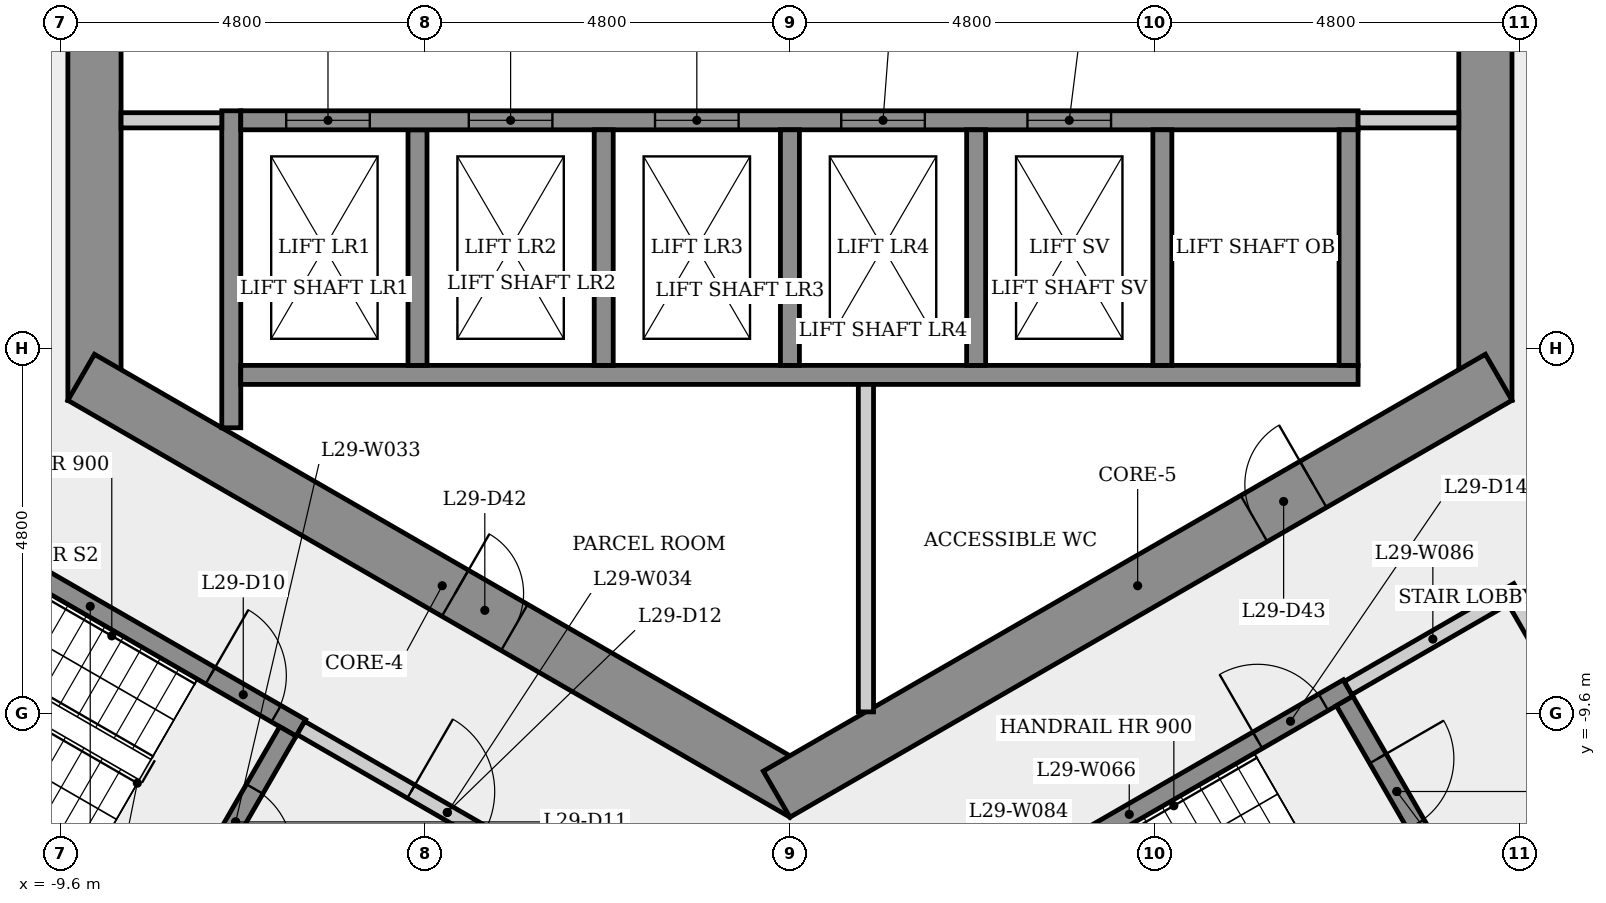
"""IFC4 building model, lengths in metres.
Left out: names, types, materials, properties, quantities, classifications, styles, units other than length and angle.
Written with IfcOpenShell. Run it as: python <this file> out.ifc"""

import sys

from ifc_helpers import new_model, si_unit, direction, frame, frame_2d, origin, place, context, subcontext, project, spatial, rectangle, extrude, element, fill, save


model = new_model("IFC4")
c1 = context("Model", 3, precision=1e-05, world=origin(), true_north=direction((0.0, 1.0)))
c2 = subcontext(c1, "Body", "Model", "MODEL_VIEW")
j1 = project(units=[si_unit("LENGTHUNIT", "METRE"), si_unit("PLANEANGLEUNIT", "RADIAN")], contexts=[c1])
p1 = place(None, origin())
s1 = spatial("IfcSite", under=j1, at=p1, CompositionType="ELEMENT")
p2 = place(p1, origin())
s2 = spatial("IfcBuilding", under=s1, at=p2, CompositionType="ELEMENT")
p3 = place(p2, frame((0.0, 0.0, 110.3)))
s3 = spatial("IfcBuildingStorey", under=s2, at=p3, CompositionType="ELEMENT", Elevation=110.3)
p4 = place(p3, frame((9.15, -5.485, 0.0), z_axis=(0.0, 0.0, 1.0), x_axis=(0.0, 1.0, 0.0)))
e1 = element("IfcWall", 1, at=p4, inside=s3, PredefinedType="SHEAR", context=c2, shape_type="SweptSolid", body=[
    extrude(rectangle(XDim=10.97, YDim=0.7, at=frame_2d((5.485, 0.0))), origin(), (0.0, 0.0, 1.0), 3.4),
])
p5 = place(p4, frame((4.685, 0.0, 0.0)))
e2 = element("IfcOpeningElement", 2, at=p5, cuts=e1, PredefinedType="OPENING", context=c2, shape_type="SweptSolid", body=[
    extrude(rectangle(XDim=1.6, YDim=2.1, at=frame_2d((0.8, 1.05))), frame((0.0, 0.36, 0.0), z_axis=(0.0, -1.0, 0.0), x_axis=(1.0, 0.0, 0.0)), (0.0, 0.0, 1.0), 0.72),
])
p6 = place(p3, frame((-9.15, 5.485, 0.0), z_axis=(0.0, 0.0, 1.0), x_axis=(0.0, -1.0, 0.0)))
e3 = element("IfcWall", 3, at=p6, inside=s3, PredefinedType="SHEAR", context=c2, shape_type="SweptSolid", body=[
    extrude(rectangle(XDim=10.97, YDim=0.7, at=frame_2d((5.485, 0.0))), origin(), (0.0, 0.0, 1.0), 3.4),
])
p7 = place(p6, frame((4.685, 0.0, 0.0)))
e4 = element("IfcOpeningElement", 4, at=p7, cuts=e3, PredefinedType="OPENING", context=c2, shape_type="SweptSolid", body=[
    extrude(rectangle(XDim=1.6, YDim=2.1, at=frame_2d((0.8, 1.05))), frame((0.0, 0.36, 0.0), z_axis=(0.0, -1.0, 0.0), x_axis=(1.0, 0.0, 0.0)), (0.0, 0.0, 1.0), 0.72),
])
p8 = place(p3, frame((-9.325, -5.182, 0.0), z_axis=(0.0, 0.0, 1.0), x_axis=(0.866023993627, -0.500002442456, 0.0)))
e5 = element("IfcWall", 5, at=p8, inside=s3, PredefinedType="SHEAR", context=c2, shape_type="SweptSolid", body=[
    extrude(rectangle(XDim=10.97, YDim=0.7, at=frame_2d((5.485, 0.0))), origin(), (0.0, 0.0, 1.0), 3.4),
])
p9 = place(p8, frame((5.682, 0.0, 0.0)))
e6 = element("IfcOpeningElement", 6, at=p9, cuts=e5, PredefinedType="OPENING", context=c2, shape_type="SweptSolid", body=[
    extrude(rectangle(XDim=0.9, YDim=2.1, at=frame_2d((0.45, 1.05))), frame((0.0, 0.36, 0.0), z_axis=(0.0, -1.0, 0.0), x_axis=(1.0, 0.0, 0.0)), (0.0, 0.0, 1.0), 0.72),
])
p10 = place(p3, frame((-0.175, -10.667, 0.0), z_axis=(0.0, 0.0, 1.0), x_axis=(0.866023993627, 0.500002442456, 0.0)))
e7 = element("IfcWall", 7, at=p10, inside=s3, PredefinedType="SHEAR", context=c2, shape_type="SweptSolid", body=[
    extrude(rectangle(XDim=10.97, YDim=0.7, at=frame_2d((5.485, 0.0))), origin(), (0.0, 0.0, 1.0), 3.4),
])
p11 = place(p10, frame((7.252, 0.0, 0.0)))
e8 = element("IfcOpeningElement", 8, at=p11, cuts=e7, PredefinedType="OPENING", context=c2, shape_type="SweptSolid", body=[
    extrude(rectangle(XDim=0.9, YDim=2.1, at=frame_2d((0.45, 1.05))), frame((0.0, 0.36, 0.0), z_axis=(0.0, -1.0, 0.0), x_axis=(1.0, 0.0, 0.0)), (0.0, 0.0, 1.0), 0.72),
])
p12 = place(p3, frame((-11.977, -6.595, 0.0), z_axis=(0.0, 0.0, 1.0), x_axis=(0.866025499775, -0.499999833739, 0.0)))
e9 = element("IfcWall", 9, at=p12, inside=s3, PredefinedType="SHEAR", context=c2, shape_type="SweptSolid", body=[
    extrude(rectangle(XDim=6.4, YDim=0.25, at=frame_2d((3.2, 0.0))), origin(), (0.0, 0.0, 1.0), 3.05),
])
p13 = place(p12, frame((5.025, 0.0, 0.0)))
e10 = element("IfcOpeningElement", 10, at=p13, cuts=e9, PredefinedType="OPENING", context=c2, shape_type="SweptSolid", body=[
    extrude(rectangle(XDim=1.0, YDim=2.1, at=frame_2d((0.5, 1.05))), frame((0.0, 0.135, 0.0), z_axis=(0.0, -1.0, 0.0), x_axis=(1.0, 0.0, 0.0)), (0.0, 0.0, 1.0), 0.27),
])
p14 = place(p3, frame((-7.935, -12.393, 0.0), z_axis=(0.0, 0.0, 1.0), x_axis=(-0.866025499775, 0.499999833739, 0.0)))
e11 = element("IfcWall", 11, at=p14, inside=s3, PredefinedType="SHEAR", context=c2, shape_type="SweptSolid", body=[
    extrude(rectangle(XDim=6.4, YDim=0.25, at=frame_2d((3.2, 0.0))), origin(), (0.0, 0.0, 1.0), 3.05),
])
p15 = place(p3, frame((-7.35, -5.846, 0.0), z_axis=(0.0, 0.0, 1.0), x_axis=(0.0, 1.0, 0.0)))
e12 = element("IfcWall", 12, at=p15, inside=s3, PredefinedType="SHEAR", context=c2, shape_type="SweptSolid", body=[
    extrude(rectangle(XDim=4.171, YDim=0.25, at=frame_2d((2.085, 0.0))), origin(), (0.0, 0.0, 1.0), 3.05),
])
p16 = place(p3, frame((-7.475, -1.8, 0.0), z_axis=(0.0, 0.0, 1.0), x_axis=(-1.0, 0.0, 0.0)))
e13 = element("IfcWall", 13, at=p16, inside=s3, PredefinedType="PARTITIONING", context=c2, shape_type="SweptSolid", body=[
    extrude(rectangle(XDim=1.325, YDim=0.2, at=frame_2d((0.663, 0.0))), origin(), (0.0, 0.0, 1.0), 3.05),
])
p17 = place(p3, frame((-6.605, -9.841, 0.0), z_axis=(0.0, 0.0, 1.0), x_axis=(-0.499996545922, -0.866027397988, 0.0)))
e14 = element("IfcWall", 14, at=p17, inside=s3, PredefinedType="SHEAR", context=c2, shape_type="SweptSolid", body=[
    extrude(rectangle(XDim=2.75, YDim=0.25, at=frame_2d((1.375, 0.0))), origin(), (0.0, 0.0, 1.0), 3.05),
])
p18 = place(p17, frame((0.875, 0.0, 0.0)))
e15 = element("IfcOpeningElement", 15, at=p18, cuts=e14, PredefinedType="OPENING", context=c2, shape_type="SweptSolid", body=[
    extrude(rectangle(XDim=1.0, YDim=2.1, at=frame_2d((0.5, 1.05))), frame((0.0, 0.135, 0.0), z_axis=(0.0, -1.0, 0.0), x_axis=(1.0, 0.0, 0.0)), (0.0, 0.0, 1.0), 0.27),
])
p19 = place(p3, frame((-6.435, -9.795, 0.0), z_axis=(0.0, 0.0, 1.0), x_axis=(0.866012907634, -0.500021643343, 0.0)))
e16 = element("IfcWall", 16, at=p19, inside=s3, PredefinedType="PARTITIONING", context=c2, shape_type="SweptSolid", body=[
    extrude(rectangle(XDim=4.45, YDim=0.2, at=frame_2d((2.225, 0.0))), origin(), (0.0, 0.0, 1.0), 3.05),
])
p20 = place(p19, frame((1.675, 0.0, 0.0)))
e17 = element("IfcOpeningElement", 17, at=p20, cuts=e16, PredefinedType="OPENING", context=c2, shape_type="SweptSolid", body=[
    extrude(rectangle(XDim=1.1, YDim=2.1, at=frame_2d((0.55, 1.05))), frame((0.0, 0.11, 0.0), z_axis=(0.0, -1.0, 0.0), x_axis=(1.0, 0.0, 0.0)), (0.0, 0.0, 1.0), 0.22),
])
p21 = place(p3, frame((-7.225, -5.15, 0.0), z_axis=(0.0, 0.0, 1.0), x_axis=(1.0, 0.0, 0.0)))
e18 = element("IfcWall", 18, at=p21, inside=s3, PredefinedType="SHEAR", context=c2, shape_type="SweptSolid", body=[
    extrude(rectangle(XDim=14.7, YDim=0.25, at=frame_2d((7.35, 0.0))), origin(), (0.0, 0.0, 1.0), 3.05),
])
p22 = place(p3, frame((-4.9, -1.925, 0.0), z_axis=(0.0, 0.0, 1.0), x_axis=(0.0, -1.0, 0.0)))
e19 = element("IfcWall", 19, at=p22, inside=s3, PredefinedType="SHEAR", context=c2, shape_type="SweptSolid", body=[
    extrude(rectangle(XDim=3.1, YDim=0.25, at=frame_2d((1.55, 0.0))), origin(), (0.0, 0.0, 1.0), 3.4),
])
p23 = place(p3, frame((-7.225, -1.8, 0.0), z_axis=(0.0, 0.0, 1.0), x_axis=(1.0, 0.0, 0.0)))
e20 = element("IfcWall", 20, at=p23, inside=s3, PredefinedType="SHEAR", context=c2, shape_type="SweptSolid", body=[
    extrude(rectangle(XDim=14.7, YDim=0.25, at=frame_2d((7.35, 0.0))), origin(), (0.0, 0.0, 1.0), 3.05),
])
p24 = place(p23, frame((0.597, 0.0, 0.0)))
e21 = element("IfcOpeningElement", 21, at=p24, cuts=e20, PredefinedType="OPENING", context=c2, shape_type="SweptSolid", body=[
    extrude(rectangle(XDim=1.1, YDim=2.1, at=frame_2d((0.55, 1.05))), frame((0.0, 0.135, 0.0), z_axis=(0.0, -1.0, 0.0), x_axis=(1.0, 0.0, 0.0)), (0.0, 0.0, 1.0), 0.27),
])
p25 = place(p23, frame((3.0, 0.0, 0.0)))
e22 = element("IfcOpeningElement", 22, at=p25, cuts=e20, PredefinedType="OPENING", context=c2, shape_type="SweptSolid", body=[
    extrude(rectangle(XDim=1.1, YDim=2.1, at=frame_2d((0.55, 1.05))), frame((0.0, 0.135, 0.0), z_axis=(0.0, -1.0, 0.0), x_axis=(1.0, 0.0, 0.0)), (0.0, 0.0, 1.0), 0.27),
])
p26 = place(p23, frame((5.45, 0.0, 0.0)))
e23 = element("IfcOpeningElement", 23, at=p26, cuts=e20, PredefinedType="OPENING", context=c2, shape_type="SweptSolid", body=[
    extrude(rectangle(XDim=1.1, YDim=2.1, at=frame_2d((0.55, 1.05))), frame((0.0, 0.135, 0.0), z_axis=(0.0, -1.0, 0.0), x_axis=(1.0, 0.0, 0.0)), (0.0, 0.0, 1.0), 0.27),
])
p27 = place(p23, frame((7.9, 0.0, 0.0)))
e24 = element("IfcOpeningElement", 24, at=p27, cuts=e20, PredefinedType="OPENING", context=c2, shape_type="SweptSolid", body=[
    extrude(rectangle(XDim=1.1, YDim=2.1, at=frame_2d((0.55, 1.05))), frame((0.0, 0.135, 0.0), z_axis=(0.0, -1.0, 0.0), x_axis=(1.0, 0.0, 0.0)), (0.0, 0.0, 1.0), 0.27),
])
p28 = place(p23, frame((10.35, 0.0, 0.0)))
e25 = element("IfcOpeningElement", 25, at=p28, cuts=e20, PredefinedType="OPENING", context=c2, shape_type="SweptSolid", body=[
    extrude(rectangle(XDim=1.1, YDim=2.1, at=frame_2d((0.55, 1.05))), frame((0.0, 0.135, 0.0), z_axis=(0.0, -1.0, 0.0), x_axis=(1.0, 0.0, 0.0)), (0.0, 0.0, 1.0), 0.27),
])
for number, where, z_axis, x_axis in (
    (26, (-2.45, -1.925, 0.0), (0.0, 0.0, 1.0), (0.0, -1.0, 0.0)),
    (27, (0.0, -1.925, 0.0), (0.0, 0.0, 1.0), (0.0, -1.0, 0.0)),
):
    element("IfcWall", number, at=place(p3, frame(where, z_axis=z_axis, x_axis=x_axis)), inside=s3, PredefinedType="SHEAR", context=c2, shape_type="SweptSolid", body=[
        extrude(rectangle(XDim=3.1, YDim=0.25, at=frame_2d((1.55, 0.0))), origin(), (0.0, 0.0, 1.0), 3.4),
    ])
p29 = place(p3, frame((1.0, -5.275, 0.0), z_axis=(0.0, 0.0, 1.0), x_axis=(0.0, -1.0, 0.0)))
e28 = element("IfcWall", 28, at=p29, inside=s3, PredefinedType="PARTITIONING", context=c2, shape_type="SweptSolid", body=[
    extrude(rectangle(XDim=4.309, YDim=0.2, at=frame_2d((2.155, 0.0))), origin(), (0.0, 0.0, 1.0), 3.05),
])
p30 = place(p3, frame((1.585, -12.595, 0.0), z_axis=(0.0, 0.0, 1.0), x_axis=(0.866036417653, 0.499980922934, 0.0)))
e29 = element("IfcWall", 29, at=p30, inside=s3, PredefinedType="SHEAR", context=c2, shape_type="SweptSolid", body=[
    extrude(rectangle(XDim=6.65, YDim=0.25, at=frame_2d((3.325, 0.0))), origin(), (0.0, 0.0, 1.0), 3.05),
])
p31 = place(p30, frame((5.275, 0.0, 0.0)))
e30 = element("IfcOpeningElement", 30, at=p31, cuts=e29, PredefinedType="OPENING", context=c2, shape_type="SweptSolid", body=[
    extrude(rectangle(XDim=1.0, YDim=2.1, at=frame_2d((0.5, 1.05))), frame((0.0, 0.135, 0.0), z_axis=(0.0, -1.0, 0.0), x_axis=(1.0, 0.0, 0.0)), (0.0, 0.0, 1.0), 0.27),
])
for number, where, z_axis, x_axis in (
    (31, (2.45, -1.925, 0.0), (0.0, 0.0, 1.0), (0.0, -1.0, 0.0)),
    (32, (4.9, -1.925, 0.0), (0.0, 0.0, 1.0), (0.0, -1.0, 0.0)),
):
    element("IfcWall", number, at=place(p3, frame(where, z_axis=z_axis, x_axis=x_axis)), inside=s3, PredefinedType="SHEAR", context=c2, shape_type="SweptSolid", body=[
        extrude(rectangle(XDim=3.1, YDim=0.25, at=frame_2d((1.55, 0.0))), origin(), (0.0, 0.0, 1.0), 3.4),
    ])
p32 = place(p3, frame((7.298, -9.441, 0.0), z_axis=(0.0, 0.0, 1.0), x_axis=(0.500034990121, -0.866005201286, 0.0)))
e33 = element("IfcWall", 33, at=p32, inside=s3, PredefinedType="SHEAR", context=c2, shape_type="SweptSolid", body=[
    extrude(rectangle(XDim=2.75, YDim=0.25, at=frame_2d((1.375, 0.0))), origin(), (0.0, 0.0, 1.0), 3.05),
])
p33 = place(p32, frame((0.875, 0.0, 0.0)))
e34 = element("IfcOpeningElement", 34, at=p33, cuts=e33, PredefinedType="OPENING", context=c2, shape_type="SweptSolid", body=[
    extrude(rectangle(XDim=1.0, YDim=2.1, at=frame_2d((0.5, 1.05))), frame((0.0, 0.135, 0.0), z_axis=(0.0, -1.0, 0.0), x_axis=(1.0, 0.0, 0.0)), (0.0, 0.0, 1.0), 0.27),
])
p34 = place(p3, frame((7.344, -9.27, 0.0), z_axis=(0.0, 0.0, 1.0), x_axis=(0.866005588531, 0.500034319456, 0.0)))
e35 = element("IfcWall", 35, at=p34, inside=s3, PredefinedType="PARTITIONING", context=c2, shape_type="SweptSolid", body=[
    extrude(rectangle(XDim=2.575, YDim=0.2, at=frame_2d((1.288, 0.0))), origin(), (0.0, 0.0, 1.0), 3.05),
])
p35 = place(p3, frame((7.35, -1.925, 0.0), z_axis=(0.0, 0.0, 1.0), x_axis=(0.0, -1.0, 0.0)))
e36 = element("IfcWall", 36, at=p35, inside=s3, PredefinedType="SHEAR", context=c2, shape_type="SweptSolid", body=[
    extrude(rectangle(XDim=3.1, YDim=0.25, at=frame_2d((1.55, 0.0))), origin(), (0.0, 0.0, 1.0), 3.4),
])
p36 = place(p3, frame((8.8, -1.8, 0.0), z_axis=(0.0, 0.0, 1.0), x_axis=(-1.0, 0.0, 0.0)))
e37 = element("IfcWall", 37, at=p36, inside=s3, PredefinedType="PARTITIONING", context=c2, shape_type="SweptSolid", body=[
    extrude(rectangle(XDim=1.325, YDim=0.2, at=frame_2d((0.663, 0.0))), origin(), (0.0, 0.0, 1.0), 3.05),
])
p37 = place(p3, frame((9.537, -8.119, 0.0), z_axis=(0.0, 0.0, 1.0), x_axis=(0.499990139034, -0.866031096941, 0.0)))
e38 = element("IfcWall", 38, at=p37, inside=s3, PredefinedType="PARTITIONING", context=c2, shape_type="SweptSolid", body=[
    extrude(rectangle(XDim=3.0, YDim=0.2, at=frame_2d((1.5, 0.0))), origin(), (0.0, 0.0, 1.0), 3.05),
])
p38 = place(p37, frame((0.935, 0.0, 0.0)))
e39 = element("IfcOpeningElement", 39, at=p38, cuts=e38, PredefinedType="OPENING", context=c2, shape_type="SweptSolid", body=[
    extrude(rectangle(XDim=1.0, YDim=2.1, at=frame_2d((0.5, 1.05))), frame((0.0, 0.11, 0.0), z_axis=(0.0, -1.0, 0.0), x_axis=(1.0, 0.0, 0.0)), (0.0, 0.0, 1.0), 0.22),
])
p39 = place(p3, frame((10.901, -10.681, 0.0), z_axis=(0.0, 0.0, 1.0), x_axis=(-0.866007538022, -0.500030943131, 0.0)))
e40 = element("IfcWall", 40, at=p39, inside=s3, PredefinedType="PARTITIONING", context=c2, shape_type="SweptSolid", body=[
    extrude(rectangle(XDim=2.375, YDim=0.2, at=frame_2d((1.188, 0.0))), origin(), (0.0, 0.0, 1.0), 3.05),
])
p40 = place(p24, origin())
e41 = element("IfcDoor", 41, at=p40, inside=s3, OperationType="SLIDING_TO_LEFT", PredefinedType="DOOR", context=c2, shape_type="SweptSolid", body=[
    extrude(rectangle(XDim=1.1, YDim=2.1, at=frame_2d((0.55, 1.05))), frame((0.0, 0.025, 0.0), z_axis=(0.0, -1.0, 0.0), x_axis=(1.0, 0.0, 0.0)), (0.0, 0.0, 1.0), 0.05),
])
fill(e21, e41)
p41 = place(p25, origin())
e42 = element("IfcDoor", 42, at=p41, inside=s3, OperationType="SLIDING_TO_LEFT", PredefinedType="DOOR", context=c2, shape_type="SweptSolid", body=[
    extrude(rectangle(XDim=1.1, YDim=2.1, at=frame_2d((0.55, 1.05))), frame((0.0, 0.025, 0.0), z_axis=(0.0, -1.0, 0.0), x_axis=(1.0, 0.0, 0.0)), (0.0, 0.0, 1.0), 0.05),
])
fill(e22, e42)
p42 = place(p26, origin())
e43 = element("IfcDoor", 43, at=p42, inside=s3, OperationType="SLIDING_TO_LEFT", PredefinedType="DOOR", context=c2, shape_type="SweptSolid", body=[
    extrude(rectangle(XDim=1.1, YDim=2.1, at=frame_2d((0.55, 1.05))), frame((0.0, 0.025, 0.0), z_axis=(0.0, -1.0, 0.0), x_axis=(1.0, 0.0, 0.0)), (0.0, 0.0, 1.0), 0.05),
])
fill(e23, e43)
p43 = place(p27, origin())
e44 = element("IfcDoor", 44, at=p43, inside=s3, OperationType="SLIDING_TO_LEFT", PredefinedType="DOOR", context=c2, shape_type="SweptSolid", body=[
    extrude(rectangle(XDim=1.1, YDim=2.1, at=frame_2d((0.55, 1.05))), frame((0.0, 0.025, 0.0), z_axis=(0.0, -1.0, 0.0), x_axis=(1.0, 0.0, 0.0)), (0.0, 0.0, 1.0), 0.05),
])
fill(e24, e44)
p44 = place(p28, origin())
e45 = element("IfcDoor", 45, at=p44, inside=s3, OperationType="SLIDING_TO_LEFT", PredefinedType="DOOR", context=c2, shape_type="SweptSolid", body=[
    extrude(rectangle(XDim=1.1, YDim=2.1, at=frame_2d((0.55, 1.05))), frame((0.0, 0.025, 0.0), z_axis=(0.0, -1.0, 0.0), x_axis=(1.0, 0.0, 0.0)), (0.0, 0.0, 1.0), 0.05),
])
fill(e25, e45)
p45 = place(p13, origin())
e46 = element("IfcDoor", 46, at=p45, inside=s3, OperationType="SINGLE_SWING_LEFT", PredefinedType="DOOR", context=c2, shape_type="SweptSolid", body=[
    extrude(rectangle(XDim=1.0, YDim=2.1, at=frame_2d((0.5, 1.05))), frame((0.0, 0.025, 0.0), z_axis=(0.0, -1.0, 0.0), x_axis=(1.0, 0.0, 0.0)), (0.0, 0.0, 1.0), 0.05),
])
fill(e10, e46)
p46 = place(p18, origin())
e47 = element("IfcDoor", 47, at=p46, inside=s3, OperationType="SINGLE_SWING_RIGHT", PredefinedType="DOOR", context=c2, shape_type="SweptSolid", body=[
    extrude(rectangle(XDim=1.0, YDim=2.1, at=frame_2d((0.5, 1.05))), frame((0.0, 0.025, 0.0), z_axis=(0.0, -1.0, 0.0), x_axis=(1.0, 0.0, 0.0)), (0.0, 0.0, 1.0), 0.05),
])
fill(e15, e47)
p47 = place(p20, origin())
e48 = element("IfcDoor", 48, at=p47, inside=s3, OperationType="SINGLE_SWING_LEFT", PredefinedType="DOOR", context=c2, shape_type="SweptSolid", body=[
    extrude(rectangle(XDim=1.1, YDim=2.1, at=frame_2d((0.55, 1.05))), frame((0.0, 0.025, 0.0), z_axis=(0.0, -1.0, 0.0), x_axis=(1.0, 0.0, 0.0)), (0.0, 0.0, 1.0), 0.05),
])
fill(e17, e48)
p48 = place(p31, origin())
e49 = element("IfcDoor", 49, at=p48, inside=s3, OperationType="SINGLE_SWING_LEFT", PredefinedType="DOOR", context=c2, shape_type="SweptSolid", body=[
    extrude(rectangle(XDim=1.0, YDim=2.1, at=frame_2d((0.5, 1.05))), frame((0.0, 0.025, 0.0), z_axis=(0.0, -1.0, 0.0), x_axis=(1.0, 0.0, 0.0)), (0.0, 0.0, 1.0), 0.05),
])
fill(e30, e49)
p49 = place(p33, origin())
e50 = element("IfcDoor", 50, at=p49, inside=s3, OperationType="SINGLE_SWING_LEFT", PredefinedType="DOOR", context=c2, shape_type="SweptSolid", body=[
    extrude(rectangle(XDim=1.0, YDim=2.1, at=frame_2d((0.5, 1.05))), frame((0.0, 0.025, 0.0), z_axis=(0.0, -1.0, 0.0), x_axis=(1.0, 0.0, 0.0)), (0.0, 0.0, 1.0), 0.05),
])
fill(e34, e50)
p50 = place(p9, origin())
e51 = element("IfcDoor", 51, at=p50, inside=s3, OperationType="SINGLE_SWING_LEFT", PredefinedType="DOOR", context=c2, shape_type="SweptSolid", body=[
    extrude(rectangle(XDim=0.9, YDim=2.1, at=frame_2d((0.45, 1.05))), frame((0.0, 0.025, 0.0), z_axis=(0.0, -1.0, 0.0), x_axis=(1.0, 0.0, 0.0)), (0.0, 0.0, 1.0), 0.05),
])
fill(e6, e51)
p51 = place(p11, origin())
e52 = element("IfcDoor", 52, at=p51, inside=s3, OperationType="SINGLE_SWING_RIGHT", PredefinedType="DOOR", context=c2, shape_type="SweptSolid", body=[
    extrude(rectangle(XDim=0.9, YDim=2.1, at=frame_2d((0.45, 1.05))), frame((0.0, 0.025, 0.0), z_axis=(0.0, -1.0, 0.0), x_axis=(1.0, 0.0, 0.0)), (0.0, 0.0, 1.0), 0.05),
])
fill(e8, e52)
save(model, sys.argv[1])
